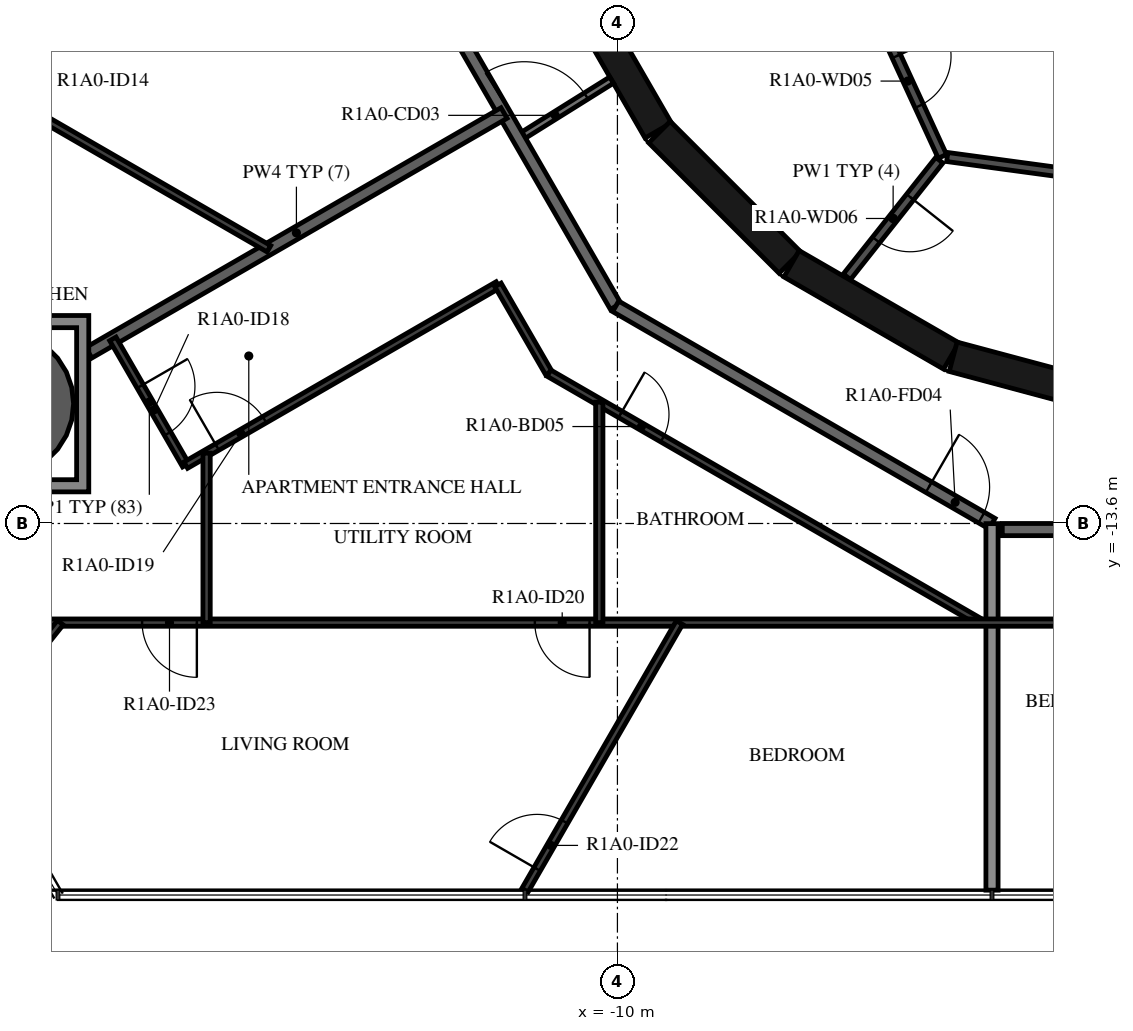
"""IFC4 building model, lengths in metres.
Left out: names, types, materials, properties, quantities, classifications, styles, units other than length and angle.
Written with IfcOpenShell. Run it as: python <this file> out.ifc"""

import sys

from ifc_helpers import new_model, si_unit, direction, frame, frame_2d, origin, origin_2d, place, context, subcontext, project, spatial, polyline, rectangle, hollow_circle, outline, extrude, element, fill, save


model = new_model("IFC4")
c1 = context("Model", 3, precision=1e-05, world=origin(), true_north=direction((0.0, 1.0)))
c2 = subcontext(c1, "Body", "Model", "MODEL_VIEW")
j1 = project(units=[si_unit("LENGTHUNIT", "METRE"), si_unit("PLANEANGLEUNIT", "RADIAN")], contexts=[c1])
p1 = place(None, origin())
s1 = spatial("IfcSite", under=j1, at=p1, CompositionType="ELEMENT")
p2 = place(p1, origin())
s2 = spatial("IfcBuilding", under=s1, at=p2, CompositionType="ELEMENT")
p3 = place(p2, frame((0.0, 0.0, 38.4)))
s3 = spatial("IfcBuildingStorey", under=s2, at=p3, CompositionType="ELEMENT", Elevation=38.4)
p4 = place(p3, frame((-20.144, -11.63, -0.45), z_axis=(0.0, 0.0, 1.0), x_axis=(1.0, 0.0, 0.0)))
e1 = element("IfcColumn", 1, at=p4, inside=s3, PredefinedType="COLUMN", context=c2, shape_type="SweptSolid", body=[
    extrude(hollow_circle(Radius=1.2, WallThickness=0.06, at=origin_2d()), origin(), (0.0, 0.0, 1.0), 3.57),
])
p5 = place(p3, frame((-10.845, -4.51, 0.0), z_axis=(0.0, 0.0, 1.0), x_axis=(0.500087131594, -0.865975092491, 0.0)))
e2 = element("IfcWall", 2, at=p5, inside=s3, PredefinedType="SHEAR", context=c2, shape_type="SweptSolid", body=[
    extrude(rectangle(XDim=3.033, YDim=0.5, at=frame_2d((1.516, 0.0))), origin(), (0.0, 0.0, 1.0), 3.12),
])
p6 = place(p3, frame((-9.308, -7.164, 0.0), z_axis=(0.0, 0.0, 1.0), x_axis=(0.707106781187, -0.707106781187, 0.0)))
e3 = element("IfcWall", 3, at=p6, inside=s3, PredefinedType="SHEAR", context=c2, shape_type="SweptSolid", body=[
    extrude(rectangle(XDim=3.032, YDim=0.5, at=frame_2d((1.516, 0.0))), origin(), (0.0, 0.0, 1.0), 3.12),
])
for number, where, z_axis, x_axis in (
    (4, (-7.137, -9.329, 0.0), (0.0, 0.0, 1.0), (0.866, -0.5, 0.0)),
    (5, (-4.479, -10.858, 0.0), (0.0, 0.0, 1.0), (0.966, -0.259, 0.0)),
):
    element("IfcWall", number, at=place(p3, frame(where, z_axis=z_axis, x_axis=x_axis)), inside=s3, PredefinedType="SHEAR", context=c2, shape_type="SweptSolid", body=[
        extrude(rectangle(XDim=3.033, YDim=0.5, at=frame_2d((1.516, 0.0))), origin(), (0.0, 0.0, 1.0), 3.12),
    ])
p7 = place(p3, frame((-5.795, -5.086, 0.0), z_axis=(0.0, 0.0, 1.0), x_axis=(0.417887867606, -0.908498613157, 0.0)))
e6 = element("IfcWall", 6, at=p7, inside=s3, PredefinedType="PARTITIONING", context=c2, shape_type="SweptSolid", body=[
    extrude(rectangle(XDim=2.726, YDim=0.15, at=frame_2d((1.363, 0.0))), origin(), (0.0, 0.0, 1.0), 3.12),
])
p8 = place(p7, frame((0.913, 0.0, 0.0)))
e7 = element("IfcOpeningElement", 7, at=p8, cuts=e6, PredefinedType="OPENING", context=c2, shape_type="SweptSolid", body=[
    extrude(rectangle(XDim=0.9, YDim=2.1, at=frame_2d((0.45, 1.05))), frame((0.0, 0.085, 0.0), z_axis=(0.0, -1.0, 0.0), x_axis=(1.0, 0.0, 0.0)), (0.0, 0.0, 1.0), 0.17),
])
p9 = place(p3, frame((-4.706, -7.625, 0.0), z_axis=(0.0, 0.0, 1.0), x_axis=(-0.621392599334, -0.783499353856, 0.0)))
e8 = element("IfcWall", 8, at=p9, inside=s3, PredefinedType="PARTITIONING", context=c2, shape_type="SweptSolid", body=[
    extrude(rectangle(XDim=2.447, YDim=0.15, at=frame_2d((1.224, 0.0))), origin(), (0.0, 0.0, 1.0), 3.12),
])
p10 = place(p9, frame((0.774, 0.0, 0.0)))
e9 = element("IfcOpeningElement", 9, at=p10, cuts=e8, PredefinedType="OPENING", context=c2, shape_type="SweptSolid", body=[
    extrude(rectangle(XDim=0.9, YDim=2.1, at=frame_2d((0.45, 1.05))), frame((0.0, 0.085, 0.0), z_axis=(0.0, -1.0, 0.0), x_axis=(1.0, 0.0, 0.0)), (0.0, 0.0, 1.0), 0.17),
])
p11 = place(p3, frame((-2.42, -7.865, 0.0), z_axis=(0.0, 0.0, 1.0), x_axis=(-0.990972299108, 0.134066783362, 0.0)))
e10 = element("IfcWall", 10, at=p11, inside=s3, PredefinedType="PARTITIONING", context=c2, shape_type="SweptSolid", body=[
    extrude(rectangle(XDim=2.176, YDim=0.15, at=frame_2d((1.088, 0.0))), origin(), (0.0, 0.0, 1.0), 3.12),
])
p12 = place(p3, frame((-11.625, -7.264, 0.0), z_axis=(0.0, 0.0, 1.0), x_axis=(0.84803632456, 0.529938102259, 0.0)))
e11 = element("IfcWall", 11, at=p12, inside=s3, PredefinedType="PARTITIONING", context=c2, shape_type="SweptSolid", body=[
    extrude(rectangle(XDim=1.804, YDim=0.12, at=frame_2d((0.902, 0.0))), origin(), (0.0, 0.0, 1.0), 3.12),
])
p13 = place(p12, frame((0.11, 0.0, 0.0)))
e12 = element("IfcOpeningElement", 12, at=p13, cuts=e11, PredefinedType="OPENING", context=c2, shape_type="SweptSolid", body=[
    extrude(rectangle(XDim=1.2, YDim=2.1, at=frame_2d((0.6, 1.05))), frame((0.0, 0.07, 0.0), z_axis=(0.0, -1.0, 0.0), x_axis=(1.0, 0.0, 0.0)), (0.0, 0.0, 1.0), 0.14),
])
p14 = place(p3, frame((-13.7, -3.671, 0.0), z_axis=(0.0, 0.0, 1.0), x_axis=(0.500001669485, -0.866024439905, 0.0)))
e13 = element("IfcWall", 13, at=p14, inside=s3, PredefinedType="STANDARD", context=c2, shape_type="SweptSolid", body=[
    extrude(rectangle(XDim=7.342, YDim=0.2, at=frame_2d((3.671, 0.0))), origin(), (0.0, 0.0, 1.0), 3.12),
])
p15 = place(p3, frame((-10.029, -10.029, 0.0), z_axis=(0.0, 0.0, 1.0), x_axis=(0.866022878987, -0.500004373052, 0.0)))
e14 = element("IfcWall", 14, at=p15, inside=s3, PredefinedType="STANDARD", context=c2, shape_type="SweptSolid", body=[
    extrude(rectangle(XDim=7.146, YDim=0.2, at=frame_2d((3.573, 0.0))), origin(), (0.0, 0.0, 1.0), 3.12),
])
p16 = place(p15, frame((5.947, 0.0, 0.0)))
e15 = element("IfcOpeningElement", 15, at=p16, cuts=e14, PredefinedType="OPENING", context=c2, shape_type="SweptSolid", body=[
    extrude(rectangle(XDim=1.0, YDim=2.1, at=frame_2d((0.5, 1.05))), frame((0.0, 0.11, 0.0), z_axis=(0.0, -1.0, 0.0), x_axis=(1.0, 0.0, 0.0)), (0.0, 0.0, 1.0), 0.22),
])
p17 = place(p3, frame((-3.671, -13.7, 0.0), z_axis=(0.0, 0.0, 1.0), x_axis=(1.0, 0.0, 0.0)))
e16 = element("IfcWall", 16, at=p17, inside=s3, PredefinedType="STANDARD", context=c2, shape_type="SweptSolid", body=[
    extrude(rectangle(XDim=7.342, YDim=0.2, at=frame_2d((3.671, 0.0))), origin(), (0.0, 0.0, 1.0), 3.12),
])
p18 = place(p17, frame((2.1, 0.0, 0.0)))
e17 = element("IfcOpeningElement", 17, at=p18, cuts=e16, PredefinedType="OPENING", context=c2, shape_type="SweptSolid", body=[
    extrude(rectangle(XDim=1.0, YDim=2.1, at=frame_2d((0.5, 1.05))), frame((0.0, 0.11, 0.0), z_axis=(0.0, -1.0, 0.0), x_axis=(1.0, 0.0, 0.0)), (0.0, 0.0, 1.0), 0.22),
])
p19 = place(p3, frame((-18.694, -10.793, 0.0), z_axis=(0.0, 0.0, 1.0), x_axis=(0.86603400694, 0.499985098601, 0.0)))
e18 = element("IfcWall", 18, at=p19, inside=s3, PredefinedType="STANDARD", context=c2, shape_type="SweptSolid", body=[
    extrude(rectangle(XDim=7.885, YDim=0.2, at=frame_2d((3.943, 0.0))), origin(), (0.0, 0.0, 1.0), 3.12),
])
p20 = place(p3, frame((-3.84, -19.63, 0.0), z_axis=(0.0, 0.0, 1.0), x_axis=(0.0, 1.0, 0.0)))
e19 = element("IfcWall", 19, at=p20, inside=s3, PredefinedType="STANDARD", context=c2, shape_type="SweptSolid", body=[
    extrude(rectangle(XDim=6.028, YDim=0.2, at=frame_2d((3.014, 0.0))), origin(), (0.0, 0.0, 1.0), 2.73),
])
p21 = place(p3, frame((-17.313, 0.472, 0.0), z_axis=(0.0, 0.0, 1.0), x_axis=(-0.499999047218, -0.866025953873, 0.0)))
e20 = element("IfcWall", 20, at=p21, inside=s3, PredefinedType="PARTITIONING", context=c2, shape_type="SweptSolid", body=[
    extrude(rectangle(XDim=11.639, YDim=0.12, at=frame_2d((5.82, 0.0))), origin(), (0.0, 0.0, 1.0), 3.12),
])
p22 = place(p21, frame((1.132, 0.0, 0.0)))
e21 = element("IfcOpeningElement", 21, at=p22, cuts=e20, PredefinedType="OPENING", context=c2, shape_type="SweptSolid", body=[
    extrude(rectangle(XDim=0.9, YDim=2.1, at=frame_2d((0.45, 1.05))), frame((0.0, 0.07, 0.0), z_axis=(0.0, -1.0, 0.0), x_axis=(1.0, 0.0, 0.0)), (0.0, 0.0, 1.0), 0.14),
])
p23 = place(p21, frame((8.083, 0.0, 0.0)))
e22 = element("IfcOpeningElement", 22, at=p23, cuts=e20, PredefinedType="OPENING", context=c2, shape_type="SweptSolid", body=[
    extrude(rectangle(XDim=0.9, YDim=2.1, at=frame_2d((0.45, 1.05))), frame((0.0, 0.07, 0.0), z_axis=(0.0, -1.0, 0.0), x_axis=(1.0, 0.0, 0.0)), (0.0, 0.0, 1.0), 0.14),
])
p24 = place(p3, frame((-21.055, -6.009, 0.0), z_axis=(0.0, 0.0, 1.0), x_axis=(0.866030172657, -0.49999173998, 0.0)))
e23 = element("IfcWall", 23, at=p24, inside=s3, PredefinedType="PARTITIONING", context=c2, shape_type="SweptSolid", body=[
    extrude(rectangle(XDim=6.147, YDim=0.12, at=frame_2d((3.074, 0.0))), origin(), (0.0, 0.0, 1.0), 3.12),
])
p25 = place(p24, frame((0.2, 0.0, 0.0)))
e24 = element("IfcOpeningElement", 24, at=p25, cuts=e23, PredefinedType="OPENING", context=c2, shape_type="SweptSolid", body=[
    extrude(rectangle(XDim=0.9, YDim=2.1, at=frame_2d((0.45, 1.05))), frame((0.0, 0.07, 0.0), z_axis=(0.0, -1.0, 0.0), x_axis=(1.0, 0.0, 0.0)), (0.0, 0.0, 1.0), 0.14),
])
p26 = place(p3, frame((-18.298, -10.564, 0.0), z_axis=(0.0, 0.0, 1.0), x_axis=(0.500048565365, -0.865997362742, 0.0)))
e25 = element("IfcWall", 25, at=p26, inside=s3, PredefinedType="PARTITIONING", context=c2, shape_type="SweptSolid", body=[
    extrude(rectangle(XDim=2.398, YDim=0.12, at=frame_2d((1.199, 0.0))), origin(), (0.0, 0.0, 1.0), 3.12),
])
p27 = place(p26, frame((0.9, 0.0, 0.0)))
e26 = element("IfcOpeningElement", 26, at=p27, cuts=e25, PredefinedType="OPENING", context=c2, shape_type="SweptSolid", body=[
    extrude(rectangle(XDim=0.9, YDim=2.1, at=frame_2d((0.45, 1.05))), frame((0.0, 0.07, 0.0), z_axis=(0.0, -1.0, 0.0), x_axis=(1.0, 0.0, 0.0)), (0.0, 0.0, 1.0), 0.14),
])
p28 = place(p3, frame((-17.099, -12.641, 0.0), z_axis=(0.0, 0.0, 1.0), x_axis=(0.866027165828, 0.499996948039, 0.0)))
e27 = element("IfcWall", 27, at=p28, inside=s3, PredefinedType="PARTITIONING", context=c2, shape_type="SweptSolid", body=[
    extrude(rectangle(XDim=5.928, YDim=0.12, at=frame_2d((2.964, 0.0))), origin(), (0.0, 0.0, 1.0), 3.12),
])
p29 = place(p28, frame((0.595, 0.0, 0.0)))
e28 = element("IfcOpeningElement", 28, at=p29, cuts=e27, PredefinedType="OPENING", context=c2, shape_type="SweptSolid", body=[
    extrude(rectangle(XDim=0.9, YDim=2.1, at=frame_2d((0.45, 1.05))), frame((0.0, 0.07, 0.0), z_axis=(0.0, -1.0, 0.0), x_axis=(1.0, 0.0, 0.0)), (0.0, 0.0, 1.0), 0.14),
])
p30 = place(p3, frame((-11.965, -9.677, 0.0), z_axis=(0.0, 0.0, 1.0), x_axis=(0.499932737185, -0.866064234506, 0.0)))
e29 = element("IfcWall", 29, at=p30, inside=s3, PredefinedType="PARTITIONING", context=c2, shape_type="SweptSolid", body=[
    extrude(rectangle(XDim=1.675, YDim=0.12, at=frame_2d((0.837, 0.0))), origin(), (0.0, 0.0, 1.0), 3.12),
])
p31 = place(p3, frame((-11.127, -11.127, 0.0), z_axis=(0.0, 0.0, 1.0), x_axis=(0.866032360344, -0.499987950692, 0.0)))
e30 = element("IfcWall", 30, at=p31, inside=s3, PredefinedType="PARTITIONING", context=c2, shape_type="SweptSolid", body=[
    extrude(rectangle(XDim=8.146, YDim=0.12, at=frame_2d((4.073, 0.0))), origin(), (0.0, 0.0, 1.0), 3.12),
])
p32 = place(p31, frame((1.357, 0.0, 0.0)))
e31 = element("IfcOpeningElement", 31, at=p32, cuts=e30, PredefinedType="OPENING", context=c2, shape_type="SweptSolid", body=[
    extrude(rectangle(XDim=0.8, YDim=2.1, at=frame_2d((0.4, 1.05))), frame((0.0, 0.07, 0.0), z_axis=(0.0, -1.0, 0.0), x_axis=(1.0, 0.0, 0.0)), (0.0, 0.0, 1.0), 0.14),
])
p33 = place(p3, frame((-1.161, -15.23, 0.0), z_axis=(0.0, 0.0, 1.0), x_axis=(-1.0, 0.0, 0.0)))
e32 = element("IfcWall", 32, at=p33, inside=s3, PredefinedType="PARTITIONING", context=c2, shape_type="SweptSolid", body=[
    extrude(rectangle(XDim=18.726, YDim=0.12, at=frame_2d((9.363, 0.0))), origin(), (0.0, 0.0, 1.0), 3.12),
])
p34 = place(p33, frame((9.297, 0.0, 0.0)))
e33 = element("IfcOpeningElement", 33, at=p34, cuts=e32, PredefinedType="OPENING", context=c2, shape_type="SweptSolid", body=[
    extrude(rectangle(XDim=0.9, YDim=2.1, at=frame_2d((0.45, 1.05))), frame((0.0, 0.07, 0.0), z_axis=(0.0, -1.0, 0.0), x_axis=(1.0, 0.0, 0.0)), (0.0, 0.0, 1.0), 0.14),
])
p35 = place(p33, frame((15.755, 0.0, 0.0)))
e34 = element("IfcOpeningElement", 34, at=p35, cuts=e32, PredefinedType="OPENING", context=c2, shape_type="SweptSolid", body=[
    extrude(rectangle(XDim=0.9, YDim=2.1, at=frame_2d((0.45, 1.05))), frame((0.0, 0.07, 0.0), z_axis=(0.0, -1.0, 0.0), x_axis=(1.0, 0.0, 0.0)), (0.0, 0.0, 1.0), 0.14),
])
p36 = place(p33, frame((0.2, 0.0, 0.0)))
e35 = element("IfcOpeningElement", 35, at=p36, cuts=e32, PredefinedType="OPENING", context=c2, shape_type="SweptSolid", body=[
    extrude(rectangle(XDim=0.9, YDim=2.1, at=frame_2d((0.45, 1.05))), frame((0.0, 0.07, 0.0), z_axis=(0.0, -1.0, 0.0), x_axis=(1.0, 0.0, 0.0)), (0.0, 0.0, 1.0), 0.14),
])
p37 = place(p3, frame((-22.381, -19.271, 0.0), z_axis=(0.0, 0.0, 1.0), x_axis=(0.623126488551, 0.782121077114, 0.0)))
e36 = element("IfcWall", 36, at=p37, inside=s3, PredefinedType="PARTITIONING", context=c2, shape_type="SweptSolid", body=[
    extrude(rectangle(XDim=5.167, YDim=0.12, at=frame_2d((2.583, 0.0))), origin(), (0.0, 0.0, 1.0), 3.12),
])
p38 = place(p37, frame((0.4, 0.0, 0.0)))
e37 = element("IfcOpeningElement", 37, at=p38, cuts=e36, PredefinedType="OPENING", context=c2, shape_type="SweptSolid", body=[
    extrude(rectangle(XDim=0.9, YDim=2.1, at=frame_2d((0.45, 1.05))), frame((0.0, 0.07, 0.0), z_axis=(0.0, -1.0, 0.0), x_axis=(1.0, 0.0, 0.0)), (0.0, 0.0, 1.0), 0.14),
])
p39 = place(p3, frame((-16.756, -15.23, 0.0), z_axis=(0.0, 0.0, 1.0), x_axis=(0.0, 1.0, 0.0)))
e38 = element("IfcWall", 38, at=p39, inside=s3, PredefinedType="PARTITIONING", context=c2, shape_type="SweptSolid", body=[
    extrude(rectangle(XDim=2.787, YDim=0.12, at=frame_2d((1.394, 0.0))), origin(), (0.0, 0.0, 1.0), 3.12),
])
p40 = place(p3, frame((-10.298, -15.23, 0.0), z_axis=(0.0, 0.0, 1.0), x_axis=(0.0, 1.0, 0.0)))
e39 = element("IfcWall", 39, at=p40, inside=s3, PredefinedType="PARTITIONING", context=c2, shape_type="SweptSolid", body=[
    extrude(rectangle(XDim=3.624, YDim=0.12, at=frame_2d((1.812, 0.0))), origin(), (0.0, 0.0, 1.0), 3.12),
])
p41 = place(p3, frame((-11.52, -19.63, 0.0), z_axis=(0.0, 0.0, 1.0), x_axis=(0.499999763888, 0.866025540104, 0.0)))
e40 = element("IfcWall", 40, at=p41, inside=s3, PredefinedType="PARTITIONING", context=c2, shape_type="SweptSolid", body=[
    extrude(rectangle(XDim=5.081, YDim=0.12, at=frame_2d((2.54, 0.0))), origin(), (0.0, 0.0, 1.0), 3.12),
])
p42 = place(p41, frame((0.4, 0.0, 0.0)))
e41 = element("IfcOpeningElement", 41, at=p42, cuts=e40, PredefinedType="OPENING", context=c2, shape_type="SweptSolid", body=[
    extrude(rectangle(XDim=0.9, YDim=2.1, at=frame_2d((0.45, 1.05))), frame((0.0, 0.07, 0.0), z_axis=(0.0, -1.0, 0.0), x_axis=(1.0, 0.0, 0.0)), (0.0, 0.0, 1.0), 0.14),
])
p43 = place(p3, origin())
e42 = element("IfcWall", 42, at=p43, inside=s3, PredefinedType="STANDARD", context=c2, shape_type="SweptSolid", body=[
    extrude(outline(polyline([(-18.694, -10.18), (-18.694, -13.08), (-21.594, -13.08), (-21.594, -10.18), (-18.694, -10.18)]), holes=[polyline([(-21.394, -12.88), (-18.894, -12.88), (-18.894, -10.38), (-21.394, -10.38), (-21.394, -12.88)])]), origin(), (0.0, 0.0, 1.0), 3.12),
])
p44 = place(p8, origin())
e43 = element("IfcDoor", 43, at=p44, inside=s3, OperationType="SINGLE_SWING_RIGHT", PredefinedType="DOOR", context=c2, shape_type="SweptSolid", body=[
    extrude(rectangle(XDim=0.9, YDim=2.1, at=frame_2d((0.45, 1.05))), frame((0.0, 0.025, 0.0), z_axis=(0.0, -1.0, 0.0), x_axis=(1.0, 0.0, 0.0)), (0.0, 0.0, 1.0), 0.05),
])
fill(e7, e43)
p45 = place(p10, origin())
e44 = element("IfcDoor", 44, at=p45, inside=s3, OperationType="SINGLE_SWING_LEFT", PredefinedType="DOOR", context=c2, shape_type="SweptSolid", body=[
    extrude(rectangle(XDim=0.9, YDim=2.1, at=frame_2d((0.45, 1.05))), frame((0.0, 0.025, 0.0), z_axis=(0.0, -1.0, 0.0), x_axis=(1.0, 0.0, 0.0)), (0.0, 0.0, 1.0), 0.05),
])
fill(e9, e44)
p46 = place(p16, origin())
e45 = element("IfcDoor", 45, at=p46, inside=s3, OperationType="SINGLE_SWING_LEFT", PredefinedType="DOOR", context=c2, shape_type="SweptSolid", body=[
    extrude(rectangle(XDim=1.0, YDim=2.1, at=frame_2d((0.5, 1.05))), frame((0.0, 0.025, 0.0), z_axis=(0.0, -1.0, 0.0), x_axis=(1.0, 0.0, 0.0)), (0.0, 0.0, 1.0), 0.05),
])
fill(e15, e45)
p47 = place(p27, origin())
e46 = element("IfcDoor", 46, at=p47, inside=s3, OperationType="SINGLE_SWING_LEFT", PredefinedType="DOOR", context=c2, shape_type="SweptSolid", body=[
    extrude(rectangle(XDim=0.9, YDim=2.1, at=frame_2d((0.45, 1.05))), frame((0.0, 0.025, 0.0), z_axis=(0.0, -1.0, 0.0), x_axis=(1.0, 0.0, 0.0)), (0.0, 0.0, 1.0), 0.05),
])
fill(e26, e46)
p48 = place(p29, origin())
e47 = element("IfcDoor", 47, at=p48, inside=s3, OperationType="SINGLE_SWING_LEFT", PredefinedType="DOOR", context=c2, shape_type="SweptSolid", body=[
    extrude(rectangle(XDim=0.9, YDim=2.1, at=frame_2d((0.45, 1.05))), frame((0.0, 0.025, 0.0), z_axis=(0.0, -1.0, 0.0), x_axis=(1.0, 0.0, 0.0)), (0.0, 0.0, 1.0), 0.05),
])
fill(e28, e47)
p49 = place(p32, origin())
e48 = element("IfcDoor", 48, at=p49, inside=s3, OperationType="SINGLE_SWING_LEFT", PredefinedType="DOOR", context=c2, shape_type="SweptSolid", body=[
    extrude(rectangle(XDim=0.8, YDim=2.1, at=frame_2d((0.4, 1.05))), frame((0.0, 0.025, 0.0), z_axis=(0.0, -1.0, 0.0), x_axis=(1.0, 0.0, 0.0)), (0.0, 0.0, 1.0), 0.05),
])
fill(e31, e48)
p50 = place(p34, origin())
e49 = element("IfcDoor", 49, at=p50, inside=s3, OperationType="SINGLE_SWING_LEFT", PredefinedType="DOOR", context=c2, shape_type="SweptSolid", body=[
    extrude(rectangle(XDim=0.9, YDim=2.1, at=frame_2d((0.45, 1.05))), frame((0.0, 0.025, 0.0), z_axis=(0.0, -1.0, 0.0), x_axis=(1.0, 0.0, 0.0)), (0.0, 0.0, 1.0), 0.05),
])
fill(e33, e49)
p51 = place(p42, origin())
e50 = element("IfcDoor", 50, at=p51, inside=s3, OperationType="SINGLE_SWING_RIGHT", PredefinedType="DOOR", context=c2, shape_type="SweptSolid", body=[
    extrude(rectangle(XDim=0.9, YDim=2.1, at=frame_2d((0.45, 1.05))), frame((0.0, 0.025, 0.0), z_axis=(0.0, -1.0, 0.0), x_axis=(1.0, 0.0, 0.0)), (0.0, 0.0, 1.0), 0.05),
])
fill(e41, e50)
p52 = place(p35, origin())
e51 = element("IfcDoor", 51, at=p52, inside=s3, OperationType="SINGLE_SWING_RIGHT", PredefinedType="DOOR", context=c2, shape_type="SweptSolid", body=[
    extrude(rectangle(XDim=0.9, YDim=2.1, at=frame_2d((0.45, 1.05))), frame((0.0, 0.025, 0.0), z_axis=(0.0, -1.0, 0.0), x_axis=(1.0, 0.0, 0.0)), (0.0, 0.0, 1.0), 0.05),
])
fill(e34, e51)
p53 = place(p13, origin())
e52 = element("IfcDoor", 52, at=p53, inside=s3, OperationType="DOUBLE_DOOR_SINGLE_SWING", PredefinedType="DOOR", context=c2, shape_type="SweptSolid", body=[
    extrude(rectangle(XDim=1.2, YDim=2.1, at=frame_2d((0.6, 1.05))), frame((0.0, 0.025, 0.0), z_axis=(0.0, -1.0, 0.0), x_axis=(1.0, 0.0, 0.0)), (0.0, 0.0, 1.0), 0.05),
])
fill(e12, e52)
save(model, sys.argv[1])
